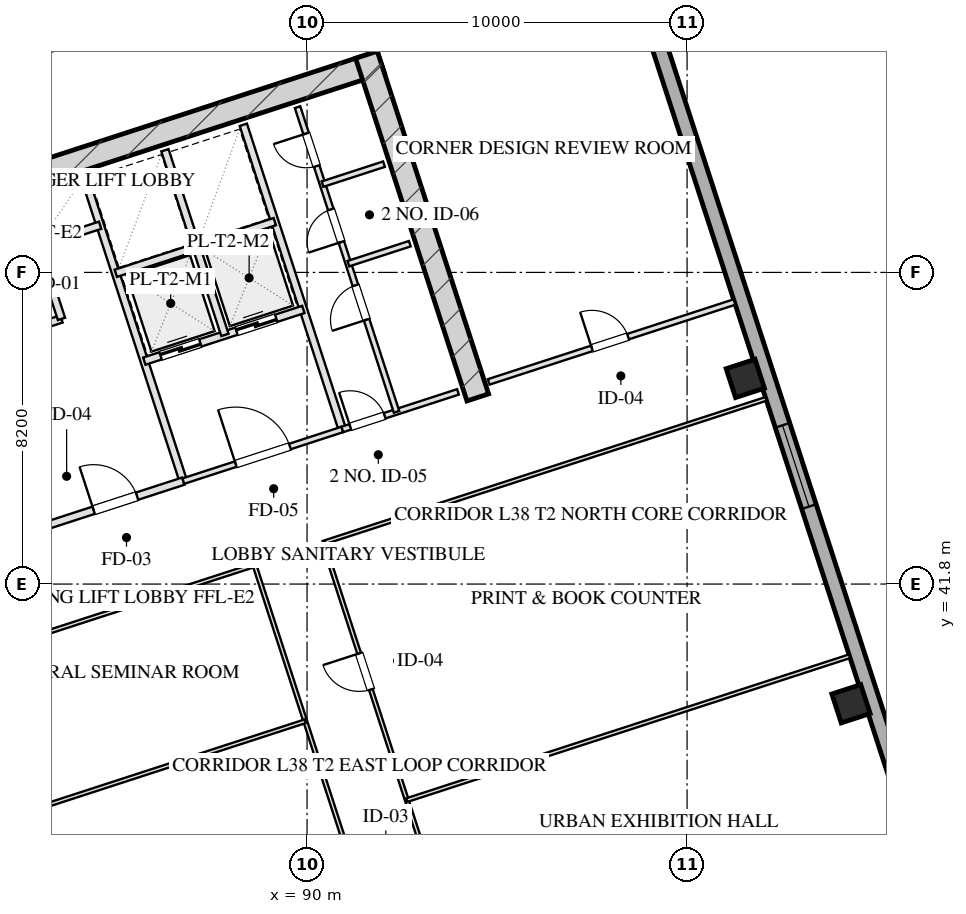
"""IFC4 building model, lengths in metres.
Left out: names, types, materials, properties, quantities, classifications, styles, units other than length and angle.
Written with IfcOpenShell. Run it as: python <this file> out.ifc"""

import sys

from ifc_helpers import new_model, si_unit, direction, frame, frame_2d, origin, origin_2d, place, context, subcontext, project, spatial, rectangle, hollow_rectangle, extrude, element, fill, save


model = new_model("IFC4")
c1 = context("Model", 3, precision=1e-05, world=origin(), true_north=direction((0.0, 1.0)))
c2 = subcontext(c1, "Body", "Model", "MODEL_VIEW")
j1 = project(units=[si_unit("LENGTHUNIT", "METRE"), si_unit("PLANEANGLEUNIT", "RADIAN")], contexts=[c1])
p1 = place(None, origin())
s1 = spatial("IfcSite", under=j1, at=p1, CompositionType="ELEMENT")
p2 = place(p1, origin())
s2 = spatial("IfcBuilding", under=s1, at=p2, CompositionType="ELEMENT")
p3 = place(p2, frame((0.0, 0.0, 146.05)))
s3 = spatial("IfcBuildingStorey", under=s2, at=p3, CompositionType="ELEMENT", Elevation=146.05)
p4 = place(p3, frame((76.344, 50.466, 0.0), z_axis=(0.0, 0.0, 1.0), x_axis=(0.951055727519, 0.309019421968, 0.0)))
e1 = element("IfcWall", 1, at=p4, inside=s3, PredefinedType="SHEAR", context=c2, shape_type="SweptSolid", body=[
    extrude(rectangle(XDim=16.4, YDim=0.6, at=frame_2d((8.2, 0.0))), origin(), (0.0, 0.0, 1.0), 3.45),
])
p5 = place(p3, frame((94.492, 46.71, 0.0), z_axis=(0.0, 0.0, 1.0), x_axis=(-0.309010370028, 0.95105866865, 0.0)))
e2 = element("IfcWall", 2, at=p5, inside=s3, PredefinedType="SHEAR", context=c2, shape_type="SweptSolid", body=[
    extrude(rectangle(XDim=9.48, YDim=0.6, at=frame_2d((4.74, 0.0))), origin(), (0.0, 0.0, 1.0), 3.45),
])
for number, where, z_axis, x_axis in (
    (3, (104.313, 38.651, 0.0), (0.0, 0.0, 1.0), (0.951, 0.309, 0.0)),
    (4, (101.532, 47.21, 0.0), (0.0, 0.0, 1.0), (0.951, 0.309, 0.0)),
    (5, (82.815, 56.112, 0.0), (0.0, 0.0, 1.0), (0.951, 0.309, 0.0)),
):
    element("IfcColumn", number, at=place(p3, frame(where, z_axis=z_axis, x_axis=x_axis)), inside=s3, PredefinedType="COLUMN", context=c2, shape_type="SweptSolid", body=[
        extrude(hollow_rectangle(XDim=0.8, YDim=0.8, WallThickness=0.028, at=origin_2d()), origin(), (0.0, 0.0, 1.0), 3.451),
    ])
p6 = place(p3, frame((70.092, 52.556, 0.0), z_axis=(0.0, 0.0, 1.0), x_axis=(0.951057580055, 0.30901372044, 0.0)))
e6 = element("IfcWall", 6, at=p6, inside=s3, PredefinedType="SOLIDWALL", context=c2, shape_type="SweptSolid", body=[
    extrude(rectangle(XDim=26.4, YDim=0.4, at=frame_2d((13.2, 0.0))), origin(), (0.0, 0.0, 1.0), 2.61),
])
p7 = place(p3, frame((98.224, 59.173, 0.0), z_axis=(0.0, 0.0, 1.0), x_axis=(0.309014228706, -0.951057414911, 0.0)))
e7 = element("IfcWall", 7, at=p7, inside=s3, PredefinedType="SOLIDWALL", context=c2, shape_type="SweptSolid", body=[
    extrude(rectangle(XDim=42.8, YDim=0.4, at=frame_2d((21.4, 0.0))), origin(), (0.0, 0.0, 1.0), 2.61),
])
p8 = place(p7, frame((13.875, 0.0, 0.75)))
e8 = element("IfcOpeningElement", 8, at=p8, cuts=e7, PredefinedType="OPENING", context=c2, shape_type="SweptSolid", body=[
    extrude(rectangle(XDim=2.25, YDim=1.46, at=frame_2d((1.125, 0.73))), frame((0.0, 0.21, 0.0), z_axis=(0.0, -1.0, 0.0), x_axis=(1.0, 0.0, 0.0)), (0.0, 0.0, 1.0), 0.42),
])
p9 = place(p7, frame((26.65, 0.0, 0.0)))
e9 = element("IfcOpeningElement", 9, at=p9, cuts=e7, PredefinedType="OPENING", context=c2, shape_type="SweptSolid", body=[
    extrude(rectangle(XDim=1.1, YDim=2.15, at=frame_2d((0.55, 1.075))), frame((0.0, 0.21, 0.0), z_axis=(0.0, -1.0, 0.0), x_axis=(1.0, 0.0, 0.0)), (0.0, 0.0, 1.0), 0.42),
])
p10 = place(p3, frame((86.743, 44.508, 0.0), z_axis=(0.0, 0.0, 1.0), x_axis=(-0.309016001439, 0.951056838919, 0.0)))
e10 = element("IfcWall", 10, at=p10, inside=s3, PredefinedType="PARTITIONING", context=c2, shape_type="SweptSolid", body=[
    extrude(rectangle(XDim=8.43, YDim=0.2, at=frame_2d((4.215, 0.0))), origin(), (0.0, 0.0, 1.0), 3.175),
])
p11 = place(p3, frame((83.101, 43.324, 0.0), z_axis=(0.0, 0.0, 1.0), x_axis=(0.951052804469, 0.309028417967, 0.0)))
e11 = element("IfcWall", 11, at=p11, inside=s3, PredefinedType="PARTITIONING", context=c2, shape_type="SweptSolid", body=[
    extrude(rectangle(XDim=3.83, YDim=0.2, at=frame_2d((1.915, 0.0))), origin(), (0.0, 0.0, 1.0), 3.175),
])
p12 = place(p11, frame((1.35, 0.0, 0.0)))
e12 = element("IfcOpeningElement", 12, at=p12, cuts=e11, PredefinedType="OPENING", context=c2, shape_type="SweptSolid", body=[
    extrude(rectangle(XDim=1.2, YDim=2.05, at=frame_2d((0.6, 1.025))), frame((0.0, 0.11, 0.0), z_axis=(0.0, -1.0, 0.0), x_axis=(1.0, 0.0, 0.0)), (0.0, 0.0, 1.0), 0.22),
])
p13 = place(p3, frame((81.54, 48.127, 0.0), z_axis=(0.0, 0.0, 1.0), x_axis=(0.951062257173, 0.308999325213, 0.0)))
e13 = element("IfcWall", 13, at=p13, inside=s3, PredefinedType="PARTITIONING", context=c2, shape_type="SweptSolid", body=[
    extrude(rectangle(XDim=2.1, YDim=0.2, at=frame_2d((1.05, 0.0))), origin(), (0.0, 0.0, 1.0), 3.175),
])
p14 = place(p13, frame((0.35, 0.0, 0.0)))
e14 = element("IfcOpeningElement", 14, at=p14, cuts=e13, PredefinedType="OPENING", context=c2, shape_type="SweptSolid", body=[
    extrude(rectangle(XDim=1.1, YDim=2.05, at=frame_2d((0.55, 1.025))), frame((0.0, 0.11, 0.0), z_axis=(0.0, -1.0, 0.0), x_axis=(1.0, 0.0, 0.0)), (0.0, 0.0, 1.0), 0.22),
])
p15 = place(p3, frame((83.538, 48.776, 0.0), z_axis=(0.0, 0.0, 1.0), x_axis=(-0.3089935693, 0.951064127245, 0.0)))
e15 = element("IfcWall", 15, at=p15, inside=s3, PredefinedType="PARTITIONING", context=c2, shape_type="SweptSolid", body=[
    extrude(rectangle(XDim=3.7, YDim=0.2, at=frame_2d((1.85, 0.0))), origin(), (0.0, 0.0, 1.0), 3.175),
])
p16 = place(p3, frame((82.91, 50.707, 0.0), z_axis=(0.0, 0.0, 1.0), x_axis=(0.951041328149, 0.309063734775, 0.0)))
e16 = element("IfcWall", 16, at=p16, inside=s3, PredefinedType="PARTITIONING", context=c2, shape_type="SweptSolid", body=[
    extrude(rectangle(XDim=1.73, YDim=0.2, at=frame_2d((0.865, 0.0))), origin(), (0.0, 0.0, 1.0), 3.175),
])
p17 = place(p3, frame((90.928, 45.868, 0.0), z_axis=(0.0, 0.0, 1.0), x_axis=(-0.309042196757, 0.951048327176, 0.0)))
e17 = element("IfcWall", 17, at=p17, inside=s3, PredefinedType="PARTITIONING", context=c2, shape_type="SweptSolid", body=[
    extrude(rectangle(XDim=8.43, YDim=0.2, at=frame_2d((4.215, 0.0))), origin(), (0.0, 0.0, 1.0), 3.175),
])
p18 = place(p3, frame((86.743, 44.508, 0.0), z_axis=(0.0, 0.0, 1.0), x_axis=(0.951063829732, 0.308994485023, 0.0)))
e18 = element("IfcWall", 18, at=p18, inside=s3, PredefinedType="PARTITIONING", context=c2, shape_type="SweptSolid", body=[
    extrude(rectangle(XDim=4.4, YDim=0.15, at=frame_2d((2.2, 0.0))), origin(), (0.0, 0.0, 1.0), 3.175),
])
p19 = place(p18, frame((1.45, 0.0, 0.0)))
e19 = element("IfcOpeningElement", 19, at=p19, cuts=e18, PredefinedType="OPENING", context=c2, shape_type="SweptSolid", body=[
    extrude(rectangle(XDim=1.5, YDim=2.05, at=frame_2d((0.75, 1.025))), frame((0.0, 0.085, 0.0), z_axis=(0.0, -1.0, 0.0), x_axis=(1.0, 0.0, 0.0)), (0.0, 0.0, 1.0), 0.17),
])
p20 = place(p3, frame((85.718, 47.666, 0.0), z_axis=(0.0, 0.0, 1.0), x_axis=(0.951058531764, 0.30901079133, 0.0)))
e20 = element("IfcWall", 20, at=p20, inside=s3, PredefinedType="PARTITIONING", context=c2, shape_type="SweptSolid", body=[
    extrude(rectangle(XDim=4.4, YDim=0.2, at=frame_2d((2.2, 0.0))), origin(), (0.0, 0.0, 1.0), 3.175),
])
p21 = place(p20, frame((0.45, 0.0, 0.0)))
e21 = element("IfcOpeningElement", 21, at=p21, cuts=e20, PredefinedType="OPENING", context=c2, shape_type="SweptSolid", body=[
    extrude(rectangle(XDim=1.1, YDim=2.05, at=frame_2d((0.55, 1.025))), frame((0.0, 0.11, 0.0), z_axis=(0.0, -1.0, 0.0), x_axis=(1.0, 0.0, 0.0)), (0.0, 0.0, 1.0), 0.22),
])
p22 = place(p20, frame((2.55, 0.0, 0.0)))
e22 = element("IfcOpeningElement", 22, at=p22, cuts=e20, PredefinedType="OPENING", context=c2, shape_type="SweptSolid", body=[
    extrude(rectangle(XDim=1.1, YDim=2.05, at=frame_2d((0.55, 1.025))), frame((0.0, 0.11, 0.0), z_axis=(0.0, -1.0, 0.0), x_axis=(1.0, 0.0, 0.0)), (0.0, 0.0, 1.0), 0.22),
])
p23 = place(p3, frame((87.838, 48.354, 0.0), z_axis=(0.0, 0.0, 1.0), x_axis=(-0.3090093719, 0.951058992953, 0.0)))
e23 = element("IfcWall", 23, at=p23, inside=s3, PredefinedType="PARTITIONING", context=c2, shape_type="SweptSolid", body=[
    extrude(rectangle(XDim=5.11, YDim=0.2, at=frame_2d((2.555, 0.0))), origin(), (0.0, 0.0, 1.0), 3.175),
])
p24 = place(p3, frame((84.967, 49.977, 0.0), z_axis=(0.0, 0.0, 1.0), x_axis=(0.951063829732, 0.308994485023, 0.0)))
e24 = element("IfcWall", 24, at=p24, inside=s3, PredefinedType="PARTITIONING", context=c2, shape_type="SweptSolid", body=[
    extrude(rectangle(XDim=4.4, YDim=0.2, at=frame_2d((2.2, 0.0))), origin(), (0.0, 0.0, 1.0), 3.175),
])
p25 = place(p3, frame((90.928, 45.868, 0.0), z_axis=(0.0, 0.0, 1.0), x_axis=(0.951059297078, 0.309008435874, 0.0)))
e25 = element("IfcWall", 25, at=p25, inside=s3, PredefinedType="PARTITIONING", context=c2, shape_type="SweptSolid", body=[
    extrude(rectangle(XDim=3.2, YDim=0.15, at=frame_2d((1.6, 0.0))), origin(), (0.0, 0.0, 1.0), 3.175),
])
p26 = place(p25, frame((0.22, 0.0, 0.0)))
e26 = element("IfcOpeningElement", 26, at=p26, cuts=e25, PredefinedType="OPENING", context=c2, shape_type="SweptSolid", body=[
    extrude(rectangle(XDim=0.95, YDim=2.05, at=frame_2d((0.475, 1.025))), frame((0.0, 0.085, 0.0), z_axis=(0.0, -1.0, 0.0), x_axis=(1.0, 0.0, 0.0)), (0.0, 0.0, 1.0), 0.17),
])
p27 = place(p3, frame((92.355, 46.331, 0.0), z_axis=(0.0, 0.0, 1.0), x_axis=(-0.309007490203, 0.951059604335, 0.0)))
e27 = element("IfcWall", 27, at=p27, inside=s3, PredefinedType="PARTITIONING", context=c2, shape_type="SweptSolid", body=[
    extrude(rectangle(XDim=8.43, YDim=0.15, at=frame_2d((4.215, 0.0))), origin(), (0.0, 0.0, 1.0), 3.175),
])
p28 = place(p27, frame((2.55, 0.0, 0.0)))
e28 = element("IfcOpeningElement", 28, at=p28, cuts=e27, PredefinedType="OPENING", context=c2, shape_type="SweptSolid", body=[
    extrude(rectangle(XDim=0.95, YDim=2.05, at=frame_2d((0.475, 1.025))), frame((0.0, 0.085, 0.0), z_axis=(0.0, -1.0, 0.0), x_axis=(1.0, 0.0, 0.0)), (0.0, 0.0, 1.0), 0.17),
])
p29 = place(p27, frame((4.7, 0.0, 0.0)))
e29 = element("IfcOpeningElement", 29, at=p29, cuts=e27, PredefinedType="OPENING", context=c2, shape_type="SweptSolid", body=[
    extrude(rectangle(XDim=0.9, YDim=2.05, at=frame_2d((0.45, 1.025))), frame((0.0, 0.085, 0.0), z_axis=(0.0, -1.0, 0.0), x_axis=(1.0, 0.0, 0.0)), (0.0, 0.0, 1.0), 0.17),
])
p30 = place(p27, frame((6.8, 0.0, 0.0)))
e30 = element("IfcOpeningElement", 30, at=p30, cuts=e27, PredefinedType="OPENING", context=c2, shape_type="SweptSolid", body=[
    extrude(rectangle(XDim=0.9, YDim=2.05, at=frame_2d((0.45, 1.025))), frame((0.0, 0.085, 0.0), z_axis=(0.0, -1.0, 0.0), x_axis=(1.0, 0.0, 0.0)), (0.0, 0.0, 1.0), 0.17),
])
p31 = place(p3, frame((91.088, 50.23, 0.0), z_axis=(0.0, 0.0, 1.0), x_axis=(0.951054116971, 0.309024378638, 0.0)))
e31 = element("IfcWall", 31, at=p31, inside=s3, PredefinedType="PARTITIONING", context=c2, shape_type="SweptSolid", body=[
    extrude(rectangle(XDim=1.7, YDim=0.15, at=frame_2d((0.85, 0.0))), origin(), (0.0, 0.0, 1.0), 3.175),
])
p32 = place(p3, frame((90.408, 52.323, 0.0), z_axis=(0.0, 0.0, 1.0), x_axis=(0.951040401051, 0.309066587596, 0.0)))
e32 = element("IfcWall", 32, at=p32, inside=s3, PredefinedType="PARTITIONING", context=c2, shape_type="SweptSolid", body=[
    extrude(rectangle(XDim=1.7, YDim=0.15, at=frame_2d((0.85, 0.0))), origin(), (0.0, 0.0, 1.0), 3.175),
])
p33 = place(p3, frame((94.78, 47.119, 0.0), z_axis=(0.0, 0.0, 1.0), x_axis=(0.951057811516, 0.309013008068, 0.0)))
e33 = element("IfcWall", 33, at=p33, inside=s3, PredefinedType="PARTITIONING", context=c2, shape_type="SweptSolid", body=[
    extrude(rectangle(XDim=6.8, YDim=0.15, at=frame_2d((3.4, 0.0))), origin(), (0.0, 0.0, 1.0), 3.175),
])
p34 = place(p33, frame((2.856, 0.0, 0.0)))
e34 = element("IfcOpeningElement", 34, at=p34, cuts=e33, PredefinedType="OPENING", context=c2, shape_type="SweptSolid", body=[
    extrude(rectangle(XDim=1.0, YDim=2.05, at=frame_2d((0.5, 1.025))), frame((0.0, 0.085, 0.0), z_axis=(0.0, -1.0, 0.0), x_axis=(1.0, 0.0, 0.0)), (0.0, 0.0, 1.0), 0.17),
])
p35 = place(p3, frame((80.106, 39.533, 0.0), z_axis=(0.0, 0.0, 1.0), x_axis=(0.951059123431, 0.309008970321, 0.0)))
e35 = element("IfcWall", 35, at=p35, inside=s3, PredefinedType="MOVABLE", context=c2, shape_type="SweptSolid", body=[
    extrude(rectangle(XDim=8.95, YDim=0.1, at=frame_2d((4.475, 0.0))), origin(), (0.0, 0.0, 1.0), 3.175),
])
p36 = place(p3, frame((90.425, 42.886, 0.0), z_axis=(0.0, 0.0, 1.0), x_axis=(0.95105749975, 0.309013967595, 0.0)))
e36 = element("IfcWall", 36, at=p36, inside=s3, PredefinedType="MOVABLE", context=c2, shape_type="SweptSolid", body=[
    extrude(rectangle(XDim=12.25, YDim=0.1, at=frame_2d((6.125, 0.0))), origin(), (0.0, 0.0, 1.0), 3.175),
])
p37 = place(p3, frame((83.441, 23.121, 0.0), z_axis=(0.0, 0.0, 1.0), x_axis=(-0.30901773025, 0.951056277195, 0.0)))
e37 = element("IfcWall", 37, at=p37, inside=s3, PredefinedType="MOVABLE", context=c2, shape_type="SweptSolid", body=[
    extrude(rectangle(XDim=16.64, YDim=0.1, at=frame_2d((8.32, 0.0))), origin(), (0.0, 0.0, 1.0), 3.175),
])
p38 = place(p37, frame((1.143, 0.0, 0.0)))
e38 = element("IfcOpeningElement", 38, at=p38, cuts=e37, PredefinedType="OPENING", context=c2, shape_type="SweptSolid", body=[
    extrude(rectangle(XDim=1.0, YDim=2.05, at=frame_2d((0.5, 1.025))), frame((0.0, 0.06, 0.0), z_axis=(0.0, -1.0, 0.0), x_axis=(1.0, 0.0, 0.0)), (0.0, 0.0, 1.0), 0.12),
])
p39 = place(p37, frame((4.703, 0.0, 0.0)))
e39 = element("IfcOpeningElement", 39, at=p39, cuts=e37, PredefinedType="OPENING", context=c2, shape_type="SweptSolid", body=[
    extrude(rectangle(XDim=1.0, YDim=2.05, at=frame_2d((0.5, 1.025))), frame((0.0, 0.06, 0.0), z_axis=(0.0, -1.0, 0.0), x_axis=(1.0, 0.0, 0.0)), (0.0, 0.0, 1.0), 0.12),
])
p40 = place(p37, frame((7.82, 0.0, 0.0)))
e40 = element("IfcOpeningElement", 40, at=p40, cuts=e37, PredefinedType="OPENING", context=c2, shape_type="SweptSolid", body=[
    extrude(rectangle(XDim=1.0, YDim=2.05, at=frame_2d((0.5, 1.025))), frame((0.0, 0.06, 0.0), z_axis=(0.0, -1.0, 0.0), x_axis=(1.0, 0.0, 0.0)), (0.0, 0.0, 1.0), 0.12),
])
p41 = place(p37, frame((10.92, 0.0, 0.0)))
e41 = element("IfcOpeningElement", 41, at=p41, cuts=e37, PredefinedType="OPENING", context=c2, shape_type="SweptSolid", body=[
    extrude(rectangle(XDim=1.0, YDim=2.05, at=frame_2d((0.5, 1.025))), frame((0.0, 0.06, 0.0), z_axis=(0.0, -1.0, 0.0), x_axis=(1.0, 0.0, 0.0)), (0.0, 0.0, 1.0), 0.12),
])
p42 = place(p37, frame((14.48, 0.0, 0.0)))
e42 = element("IfcOpeningElement", 42, at=p42, cuts=e37, PredefinedType="OPENING", context=c2, shape_type="SweptSolid", body=[
    extrude(rectangle(XDim=1.05, YDim=2.05, at=frame_2d((0.525, 1.025))), frame((0.0, 0.06, 0.0), z_axis=(0.0, -1.0, 0.0), x_axis=(1.0, 0.0, 0.0)), (0.0, 0.0, 1.0), 0.12),
])
p43 = place(p3, frame((85.248, 23.708, 0.0), z_axis=(0.0, 0.0, 1.0), x_axis=(-0.309004459387, 0.951060589068, 0.0)))
e43 = element("IfcWall", 43, at=p43, inside=s3, PredefinedType="MOVABLE", context=c2, shape_type="SweptSolid", body=[
    extrude(rectangle(XDim=16.64, YDim=0.1, at=frame_2d((8.32, 0.0))), origin(), (0.0, 0.0, 1.0), 3.175),
])
p44 = place(p43, frame((1.944, 0.0, 0.0)))
e44 = element("IfcOpeningElement", 44, at=p44, cuts=e43, PredefinedType="OPENING", context=c2, shape_type="SweptSolid", body=[
    extrude(rectangle(XDim=1.1, YDim=2.05, at=frame_2d((0.55, 1.025))), frame((0.0, 0.06, 0.0), z_axis=(0.0, -1.0, 0.0), x_axis=(1.0, 0.0, 0.0)), (0.0, 0.0, 1.0), 0.12),
])
p45 = place(p43, frame((14.264, 0.0, 0.0)))
e45 = element("IfcOpeningElement", 45, at=p45, cuts=e43, PredefinedType="OPENING", context=c2, shape_type="SweptSolid", body=[
    extrude(rectangle(XDim=1.1, YDim=2.05, at=frame_2d((0.55, 1.025))), frame((0.0, 0.06, 0.0), z_axis=(0.0, -1.0, 0.0), x_axis=(1.0, 0.0, 0.0)), (0.0, 0.0, 1.0), 0.12),
])
p46 = place(p3, frame((93.76, 26.473, 0.0), z_axis=(0.0, 0.0, 1.0), x_axis=(-0.309004459387, 0.951060589068, 0.0)))
e46 = element("IfcWall", 46, at=p46, inside=s3, PredefinedType="MOVABLE", context=c2, shape_type="SweptSolid", body=[
    extrude(rectangle(XDim=16.64, YDim=0.1, at=frame_2d((8.32, 0.0))), origin(), (0.0, 0.0, 1.0), 3.175),
])
p47 = place(p46, frame((7.68, 0.0, 0.0)))
e47 = element("IfcOpeningElement", 47, at=p47, cuts=e46, PredefinedType="OPENING", context=c2, shape_type="SweptSolid", body=[
    extrude(rectangle(XDim=1.1, YDim=2.05, at=frame_2d((0.55, 1.025))), frame((0.0, 0.06, 0.0), z_axis=(0.0, -1.0, 0.0), x_axis=(1.0, 0.0, 0.0)), (0.0, 0.0, 1.0), 0.12),
])
p48 = place(p3, frame((95.567, 27.061, 0.0), z_axis=(0.0, 0.0, 1.0), x_axis=(-0.30901773025, 0.951056277195, 0.0)))
e48 = element("IfcWall", 48, at=p48, inside=s3, PredefinedType="MOVABLE", context=c2, shape_type="SweptSolid", body=[
    extrude(rectangle(XDim=16.64, YDim=0.1, at=frame_2d((8.32, 0.0))), origin(), (0.0, 0.0, 1.0), 3.175),
])
p49 = place(p48, frame((1.66, 0.0, 0.0)))
e49 = element("IfcOpeningElement", 49, at=p49, cuts=e48, PredefinedType="OPENING", context=c2, shape_type="SweptSolid", body=[
    extrude(rectangle(XDim=1.0, YDim=2.05, at=frame_2d((0.5, 1.025))), frame((0.0, 0.06, 0.0), z_axis=(0.0, -1.0, 0.0), x_axis=(1.0, 0.0, 0.0)), (0.0, 0.0, 1.0), 0.12),
])
p50 = place(p48, frame((6.42, 0.0, 0.0)))
e50 = element("IfcOpeningElement", 50, at=p50, cuts=e48, PredefinedType="OPENING", context=c2, shape_type="SweptSolid", body=[
    extrude(rectangle(XDim=1.0, YDim=2.05, at=frame_2d((0.5, 1.025))), frame((0.0, 0.06, 0.0), z_axis=(0.0, -1.0, 0.0), x_axis=(1.0, 0.0, 0.0)), (0.0, 0.0, 1.0), 0.12),
])
p51 = place(p48, frame((12.58, 0.0, 0.0)))
e51 = element("IfcOpeningElement", 51, at=p51, cuts=e48, PredefinedType="OPENING", context=c2, shape_type="SweptSolid", body=[
    extrude(rectangle(XDim=1.0, YDim=2.05, at=frame_2d((0.5, 1.025))), frame((0.0, 0.06, 0.0), z_axis=(0.0, -1.0, 0.0), x_axis=(1.0, 0.0, 0.0)), (0.0, 0.0, 1.0), 0.12),
])
p52 = place(p3, frame((81.441, 35.425, 0.0), z_axis=(0.0, 0.0, 1.0), x_axis=(0.951056518616, 0.309016987233, 0.0)))
e52 = element("IfcWall", 52, at=p52, inside=s3, PredefinedType="MOVABLE", context=c2, shape_type="SweptSolid", body=[
    extrude(rectangle(XDim=8.95, YDim=0.1, at=frame_2d((4.475, 0.0))), origin(), (0.0, 0.0, 1.0), 3.175),
])
p53 = place(p3, frame((92.625, 36.115, 0.0), z_axis=(0.0, 0.0, 1.0), x_axis=(0.95105749975, 0.309013967595, 0.0)))
e53 = element("IfcWall", 53, at=p53, inside=s3, PredefinedType="MOVABLE", context=c2, shape_type="SweptSolid", body=[
    extrude(rectangle(XDim=12.25, YDim=0.1, at=frame_2d((6.125, 0.0))), origin(), (0.0, 0.0, 1.0), 3.175),
])
p54 = place(p8, origin())
e54 = element("IfcWindow", 54, at=p54, inside=s3, PartitioningType="TRIPLE_PANEL_VERTICAL", PredefinedType="WINDOW", context=c2, shape_type="SweptSolid", body=[
    extrude(rectangle(XDim=2.25, YDim=1.46, at=frame_2d((1.125, 0.73))), frame((0.0, 0.03, 0.0), z_axis=(0.0, -1.0, 0.0), x_axis=(1.0, 0.0, 0.0)), (0.0, 0.0, 1.0), 0.06),
])
fill(e8, e54)
p55 = place(p12, origin())
e55 = element("IfcDoor", 55, at=p55, inside=s3, OperationType="SINGLE_SWING_LEFT", PredefinedType="DOOR", context=c2, shape_type="SweptSolid", body=[
    extrude(rectangle(XDim=1.2, YDim=2.05, at=frame_2d((0.6, 1.025))), frame((0.0, 0.025, 0.0), z_axis=(0.0, -1.0, 0.0), x_axis=(1.0, 0.0, 0.0)), (0.0, 0.0, 1.0), 0.05),
])
fill(e12, e55)
p56 = place(p19, origin())
e56 = element("IfcDoor", 56, at=p56, inside=s3, OperationType="SINGLE_SWING_LEFT", PredefinedType="DOOR", context=c2, shape_type="SweptSolid", body=[
    extrude(rectangle(XDim=1.5, YDim=2.05, at=frame_2d((0.75, 1.025))), frame((0.0, 0.025, 0.0), z_axis=(0.0, -1.0, 0.0), x_axis=(1.0, 0.0, 0.0)), (0.0, 0.0, 1.0), 0.05),
])
fill(e19, e56)
p57 = place(p21, origin())
e57 = element("IfcDoor", 57, at=p57, inside=s3, OperationType="DOUBLE_DOOR_SLIDING", PredefinedType="DOOR", context=c2, shape_type="SweptSolid", body=[
    extrude(rectangle(XDim=1.1, YDim=2.05, at=frame_2d((0.55, 1.025))), frame((0.0, 0.025, 0.0), z_axis=(0.0, -1.0, 0.0), x_axis=(1.0, 0.0, 0.0)), (0.0, 0.0, 1.0), 0.05),
])
fill(e21, e57)
p58 = place(p22, origin())
e58 = element("IfcDoor", 58, at=p58, inside=s3, OperationType="DOUBLE_DOOR_SLIDING", PredefinedType="DOOR", context=c2, shape_type="SweptSolid", body=[
    extrude(rectangle(XDim=1.1, YDim=2.05, at=frame_2d((0.55, 1.025))), frame((0.0, 0.025, 0.0), z_axis=(0.0, -1.0, 0.0), x_axis=(1.0, 0.0, 0.0)), (0.0, 0.0, 1.0), 0.05),
])
fill(e22, e58)
p59 = place(p26, origin())
e59 = element("IfcDoor", 59, at=p59, inside=s3, OperationType="SINGLE_SWING_LEFT", PredefinedType="DOOR", context=c2, shape_type="SweptSolid", body=[
    extrude(rectangle(XDim=0.95, YDim=2.05, at=frame_2d((0.475, 1.025))), frame((0.0, 0.025, 0.0), z_axis=(0.0, -1.0, 0.0), x_axis=(1.0, 0.0, 0.0)), (0.0, 0.0, 1.0), 0.05),
])
fill(e26, e59)
p60 = place(p28, origin())
e60 = element("IfcDoor", 60, at=p60, inside=s3, OperationType="SINGLE_SWING_LEFT", PredefinedType="DOOR", context=c2, shape_type="SweptSolid", body=[
    extrude(rectangle(XDim=0.95, YDim=2.05, at=frame_2d((0.475, 1.025))), frame((0.0, 0.025, 0.0), z_axis=(0.0, -1.0, 0.0), x_axis=(1.0, 0.0, 0.0)), (0.0, 0.0, 1.0), 0.05),
])
fill(e28, e60)
p61 = place(p29, origin())
e61 = element("IfcDoor", 61, at=p61, inside=s3, OperationType="SINGLE_SWING_LEFT", PredefinedType="DOOR", context=c2, shape_type="SweptSolid", body=[
    extrude(rectangle(XDim=0.9, YDim=2.05, at=frame_2d((0.45, 1.025))), frame((0.0, 0.025, 0.0), z_axis=(0.0, -1.0, 0.0), x_axis=(1.0, 0.0, 0.0)), (0.0, 0.0, 1.0), 0.05),
])
fill(e29, e61)
p62 = place(p30, origin())
e62 = element("IfcDoor", 62, at=p62, inside=s3, OperationType="SINGLE_SWING_RIGHT", PredefinedType="DOOR", context=c2, shape_type="SweptSolid", body=[
    extrude(rectangle(XDim=0.9, YDim=2.05, at=frame_2d((0.45, 1.025))), frame((0.0, 0.025, 0.0), z_axis=(0.0, -1.0, 0.0), x_axis=(1.0, 0.0, 0.0)), (0.0, 0.0, 1.0), 0.05),
])
fill(e30, e62)
p63 = place(p34, origin())
e63 = element("IfcDoor", 63, at=p63, inside=s3, OperationType="SINGLE_SWING_LEFT", PredefinedType="DOOR", context=c2, shape_type="SweptSolid", body=[
    extrude(rectangle(XDim=1.0, YDim=2.05, at=frame_2d((0.5, 1.025))), frame((0.0, 0.025, 0.0), z_axis=(0.0, -1.0, 0.0), x_axis=(1.0, 0.0, 0.0)), (0.0, 0.0, 1.0), 0.05),
])
fill(e34, e63)
p64 = place(p51, origin())
e64 = element("IfcDoor", 64, at=p64, inside=s3, OperationType="SINGLE_SWING_RIGHT", PredefinedType="DOOR", context=c2, shape_type="SweptSolid", body=[
    extrude(rectangle(XDim=1.0, YDim=2.05, at=frame_2d((0.5, 1.025))), frame((0.0, 0.025, 0.0), z_axis=(0.0, -1.0, 0.0), x_axis=(1.0, 0.0, 0.0)), (0.0, 0.0, 1.0), 0.05),
])
fill(e51, e64)
save(model, sys.argv[1])
